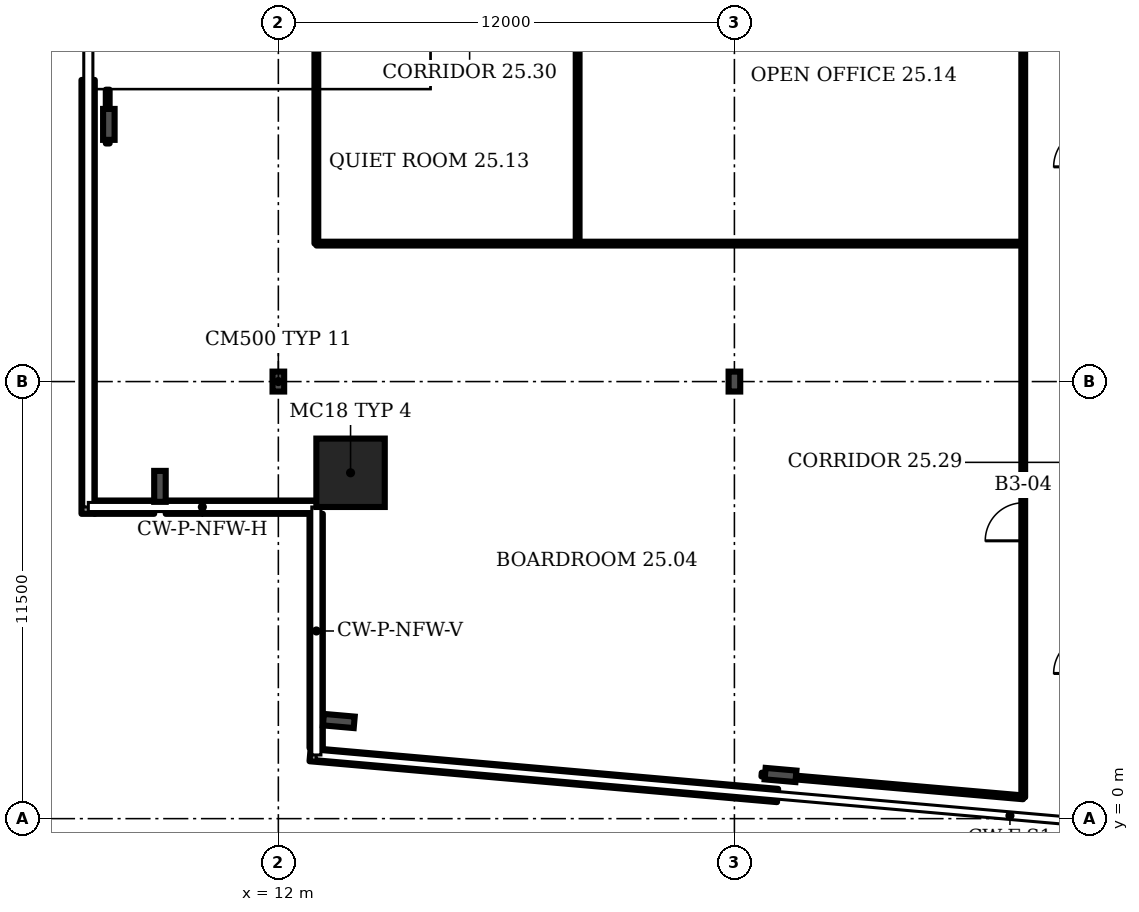
"""IFC4 building model, lengths in metres.
Left out: names, types, materials, properties, quantities, classifications, styles, units other than length and angle.
Written with IfcOpenShell. Run it as: python <this file> out.ifc"""

import sys

from ifc_helpers import new_model, si_unit, direction, frame, frame_2d, origin, origin_2d, place, context, subcontext, project, spatial, rectangle, i_section, extrude, element, fill, save


model = new_model("IFC4")
c1 = context("Model", 3, precision=1e-05, world=origin(), true_north=direction((0.0, 1.0)))
c2 = subcontext(c1, "Body", "Model", "MODEL_VIEW")
j1 = project(units=[si_unit("LENGTHUNIT", "METRE"), si_unit("PLANEANGLEUNIT", "RADIAN")], contexts=[c1])
p1 = place(None, origin())
s1 = spatial("IfcSite", under=j1, at=p1, CompositionType="ELEMENT")
p2 = place(p1, origin())
s2 = spatial("IfcBuilding", under=s1, at=p2, CompositionType="ELEMENT")
p3 = place(p2, frame((0.0, 0.0, 111.1)))
s3 = spatial("IfcBuildingStorey", under=s2, at=p3, CompositionType="ELEMENT", Elevation=111.1)
p4 = place(p3, frame((13.9, 9.1, 0.0), z_axis=(0.0, 0.0, 1.0), x_axis=(1.0, 0.0, 0.0)))
e1 = element("IfcColumn", 1, at=p4, inside=s3, PredefinedType="COLUMN", context=c2, shape_type="SweptSolid", body=[
    extrude(rectangle(XDim=1.8, YDim=1.8, at=origin_2d()), origin(), (0.0, 0.0, 1.0), 3.6),
])
for number, where, z_axis, x_axis in (
    (2, (13.591, 2.569, 0.0), (0.0, 0.0, 1.0), (-0.087, -0.996, 0.0)),
    (3, (25.214, 1.149, 0.0), (0.0, 0.0, 1.0), (-0.087, -0.996, 0.0)),
    (4, (7.54, 18.267, 0.0), (0.0, 0.0, 1.0), (-1.0, 0.0, 0.0)),
    (5, (8.885, 8.743, 0.0), (0.0, 0.0, 1.0), (-1.0, 0.0, 0.0)),
):
    element("IfcColumn", number, at=place(p3, frame(where, z_axis=z_axis, x_axis=x_axis)), inside=s3, PredefinedType="COLUMN", context=c2, shape_type="SweptSolid", body=[
        extrude(i_section(OverallWidth=0.303, OverallDepth=0.814, WebThickness=0.021, FlangeThickness=0.04, FilletRadius=0.03, at=origin_2d()), origin(), (0.0, 0.0, 1.0), 3.6),
    ])
for number, where, z_axis, x_axis in (
    (6, (12.0, 11.5, 0.0), (0.0, 0.0, 1.0), (1.0, 0.0, 0.0)),
    (7, (24.0, 11.5, 0.0), (0.0, 0.0, 1.0), (1.0, 0.0, 0.0)),
):
    element("IfcColumn", number, at=place(p3, frame(where, z_axis=z_axis, x_axis=x_axis)), inside=s3, PredefinedType="COLUMN", context=c2, shape_type="SweptSolid", body=[
        extrude(i_section(OverallWidth=0.306, OverallDepth=0.524, WebThickness=0.021, FlangeThickness=0.04, FilletRadius=0.027, at=origin_2d()), origin(), (0.0, 0.0, 1.0), 3.6),
    ])
p5 = place(p3, frame((12.835, 1.685, 0.0), z_axis=(0.0, 0.0, 1.0), x_axis=(0.996192, -0.087173, 0.0)))
e8 = element("IfcWall", 8, at=p5, inside=s3, PredefinedType="SOLIDWALL", context=c2, shape_type="SweptSolid", body=[
    extrude(rectangle(XDim=12.348, YDim=0.35, at=frame_2d((6.174, 0.0))), origin(), (0.0, 0.0, 1.0), 1.0),
])
p6 = place(p3, frame((6.995, 19.437, 0.0), z_axis=(0.0, 0.0, 1.0), x_axis=(0.0, -1.0, 0.0)))
e9 = element("IfcWall", 9, at=p6, inside=s3, PredefinedType="SOLIDWALL", context=c2, shape_type="SweptSolid", body=[
    extrude(rectangle(XDim=11.417, YDim=0.35, at=frame_2d((5.708, 0.0))), origin(), (0.0, 0.0, 1.0), 1.0),
])
p7 = place(p3, frame((7.17, 8.195, 0.0), z_axis=(0.0, 0.0, 1.0), x_axis=(1.0, 0.0, 0.0)))
e10 = element("IfcWall", 10, at=p7, inside=s3, PredefinedType="SOLIDWALL", context=c2, shape_type="SweptSolid", body=[
    extrude(rectangle(XDim=1.563, YDim=0.35, at=frame_2d((0.782, 0.0))), origin(), (0.0, 0.0, 1.0), 1.0),
])
p8 = place(p3, frame((9.036, 8.195, 0.0), z_axis=(0.0, 0.0, 1.0), x_axis=(1.0, 0.0, 0.0)))
e11 = element("IfcWall", 11, at=p8, inside=s3, PredefinedType="SOLIDWALL", context=c2, shape_type="SweptSolid", body=[
    extrude(rectangle(XDim=3.964, YDim=0.35, at=frame_2d((1.982, 0.0))), origin(), (0.0, 0.0, 1.0), 1.0),
])
p9 = place(p3, frame((12.995, 8.02, 0.0), z_axis=(0.0, 0.0, 1.0), x_axis=(0.0, -1.0, 0.0)))
e12 = element("IfcWall", 12, at=p9, inside=s3, PredefinedType="SOLIDWALL", context=c2, shape_type="SweptSolid", body=[
    extrude(rectangle(XDim=6.161, YDim=0.35, at=frame_2d((3.081, 0.0))), origin(), (0.0, 0.0, 1.0), 1.0),
])
p10 = place(p3, frame((7.51, 17.765, 0.0), z_axis=(0.0, 0.0, 1.0), x_axis=(0.0, 1.0, 0.0)))
e13 = element("IfcWall", 13, at=p10, inside=s3, PredefinedType="PARTITIONING", context=c2, shape_type="SweptSolid", body=[
    extrude(rectangle(XDim=1.415, YDim=0.1, at=frame_2d((0.708, 0.0))), origin(), (0.0, 0.0, 1.0), 2.58),
])
p11 = place(p3, frame((13.0, 15.13, 0.0), z_axis=(0.0, 0.0, 1.0), x_axis=(0.0, 1.0, 0.0)))
e14 = element("IfcWall", 14, at=p11, inside=s3, PredefinedType="PARTITIONING", context=c2, shape_type="SweptSolid", body=[
    extrude(rectangle(XDim=5.395, YDim=0.1, at=frame_2d((2.698, 0.0))), origin(), (0.0, 0.0, 1.0), 3.2),
])
p12 = place(p3, frame((13.0, 15.13, 0.0), z_axis=(0.0, 0.0, 1.0), x_axis=(1.0, 0.0, 0.0)))
e15 = element("IfcWall", 15, at=p12, inside=s3, PredefinedType="PARTITIONING", context=c2, shape_type="SweptSolid", body=[
    extrude(rectangle(XDim=18.6, YDim=0.1, at=frame_2d((9.3, 0.0))), origin(), (0.0, 0.0, 1.0), 3.2),
])
p13 = place(p3, frame((19.875, 15.13, 0.0), z_axis=(0.0, 0.0, 1.0), x_axis=(0.0, 1.0, 0.0)))
e16 = element("IfcWall", 16, at=p13, inside=s3, PredefinedType="PARTITIONING", context=c2, shape_type="SweptSolid", body=[
    extrude(rectangle(XDim=15.37, YDim=0.1, at=frame_2d((7.685, 0.0))), origin(), (0.0, 0.0, 1.0), 3.2),
])
p14 = place(p3, frame((31.6, 0.56, 0.0), z_axis=(0.0, 0.0, 1.0), x_axis=(0.0, 1.0, 0.0)))
e17 = element("IfcWall", 17, at=p14, inside=s3, PredefinedType="PARTITIONING", context=c2, shape_type="SweptSolid", body=[
    extrude(rectangle(XDim=29.94, YDim=0.1, at=frame_2d((14.97, 0.0))), origin(), (0.0, 0.0, 1.0), 3.2),
])
p15 = place(p14, frame((6.75, 0.0, 0.0)))
e18 = element("IfcOpeningElement", 18, at=p15, cuts=e17, PredefinedType="OPENING", context=c2, shape_type="SweptSolid", body=[
    extrude(rectangle(XDim=1.0, YDim=2.1, at=frame_2d((0.5, 1.05))), frame((0.0, 0.06, 0.0), z_axis=(0.0, -1.0, 0.0), x_axis=(1.0, 0.0, 0.0)), (0.0, 0.0, 1.0), 0.12),
])
p16 = place(p14, frame((27.245, 0.0, 0.0)))
e19 = element("IfcOpeningElement", 19, at=p16, cuts=e17, PredefinedType="OPENING", context=c2, shape_type="SweptSolid", body=[
    extrude(rectangle(XDim=1.8, YDim=2.1, at=frame_2d((0.9, 1.05))), frame((0.0, 0.06, 0.0), z_axis=(0.0, -1.0, 0.0), x_axis=(1.0, 0.0, 0.0)), (0.0, 0.0, 1.0), 0.12),
])
p17 = place(p3, frame((31.6, 0.56, 0.0), z_axis=(0.0, 0.0, 1.0), x_axis=(-0.996229, 0.086796, 0.0)))
e20 = element("IfcWall", 20, at=p17, inside=s3, PredefinedType="PARTITIONING", context=c2, shape_type="SweptSolid", body=[
    extrude(rectangle(XDim=6.911, YDim=0.1, at=frame_2d((3.456, 0.0))), origin(), (0.0, 0.0, 1.0), 2.58),
])
p18 = place(p15, origin())
e21 = element("IfcDoor", 21, at=p18, inside=s3, OperationType="SINGLE_SWING_LEFT", PredefinedType="DOOR", context=c2, shape_type="SweptSolid", body=[
    extrude(rectangle(XDim=1.0, YDim=2.1, at=frame_2d((0.5, 1.05))), frame((0.0, 0.025, 0.0), z_axis=(0.0, -1.0, 0.0), x_axis=(1.0, 0.0, 0.0)), (0.0, 0.0, 1.0), 0.05),
])
fill(e18, e21)
save(model, sys.argv[1])
